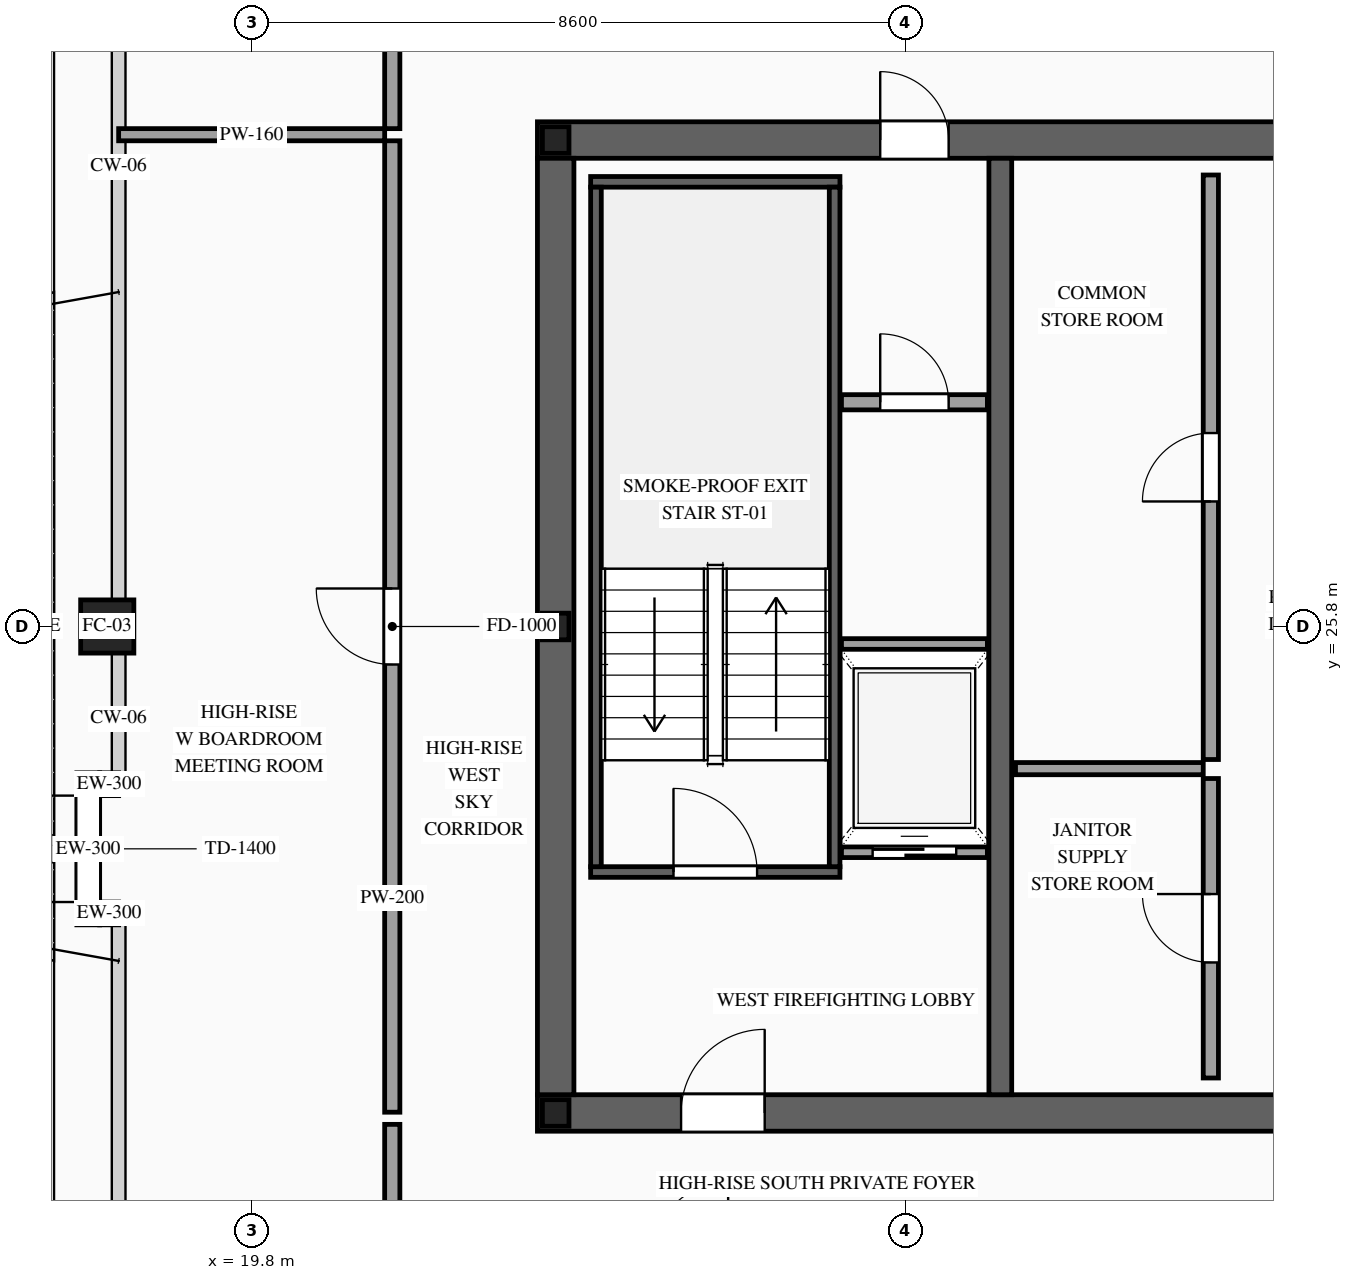
"""IFC4 building model, lengths in metres.
Left out: names, types, materials, properties, quantities, classifications, styles, units other than length and angle.
Written with IfcOpenShell. Run it as: python <this file> out.ifc"""

import sys

from ifc_helpers import new_model, si_unit, direction, frame, frame_2d, origin, origin_2d, place, context, subcontext, project, spatial, rectangle, hollow_rectangle, i_section, extrude, source, transform, mapped, element, fill, save


model = new_model("IFC4")
c1 = context("Model", 3, precision=1e-05, world=origin(), true_north=direction((0.0, 1.0)))
c2 = subcontext(c1, "Body", "Model", "MODEL_VIEW")
j1 = project(units=[si_unit("LENGTHUNIT", "METRE"), si_unit("PLANEANGLEUNIT", "RADIAN")], contexts=[c1])
p1 = place(None, origin())
s1 = spatial("IfcSite", under=j1, at=p1, CompositionType="ELEMENT")
p2 = place(p1, origin())
s2 = spatial("IfcBuilding", under=s1, at=p2, CompositionType="ELEMENT")
p3 = place(p2, frame((0.0, 0.0, 292.6)))
s3 = spatial("IfcBuildingStorey", under=s2, at=p3, CompositionType="ELEMENT", Elevation=292.6)
p4 = place(p3, frame((23.56, 19.4, 0.0), z_axis=(0.0, 0.0, 1.0), x_axis=(1.0, 0.0, 0.0)))
e1 = element("IfcWall", 1, at=p4, inside=s3, PredefinedType="SHEAR", context=c2, shape_type="SweptSolid", body=[
    extrude(rectangle(XDim=26.88, YDim=0.48, at=frame_2d((13.44, 0.0))), origin(), (0.0, 0.0, 1.0), 3.5),
])
p5 = place(p4, frame((1.89, 0.0, 0.0)))
e2 = element("IfcOpeningElement", 2, at=p5, cuts=e1, PredefinedType="OPENING", context=c2, shape_type="SweptSolid", body=[
    extrude(rectangle(XDim=1.1, YDim=2.2, at=frame_2d((0.55, 1.1))), frame((0.0, 0.255, 0.0), z_axis=(0.0, -1.0, 0.0), x_axis=(1.0, 0.0, 0.0)), (0.0, 0.0, 1.0), 0.51),
])
p6 = place(p4, frame((9.79, 0.0, 0.0)))
e3 = element("IfcOpeningElement", 3, at=p6, cuts=e1, PredefinedType="OPENING", context=c2, shape_type="SweptSolid", body=[
    extrude(rectangle(XDim=1.1, YDim=2.2, at=frame_2d((0.55, 1.1))), frame((0.0, 0.255, 0.0), z_axis=(0.0, -1.0, 0.0), x_axis=(1.0, 0.0, 0.0)), (0.0, 0.0, 1.0), 0.51),
])
p7 = place(p4, frame((22.99, 0.0, 0.0)))
e4 = element("IfcOpeningElement", 4, at=p7, cuts=e1, PredefinedType="OPENING", context=c2, shape_type="SweptSolid", body=[
    extrude(rectangle(XDim=1.1, YDim=2.2, at=frame_2d((0.55, 1.1))), frame((0.0, 0.255, 0.0), z_axis=(0.0, -1.0, 0.0), x_axis=(1.0, 0.0, 0.0)), (0.0, 0.0, 1.0), 0.51),
])
p8 = place(p4, frame((19.61, 0.0, 0.0)))
e5 = element("IfcOpeningElement", 5, at=p8, cuts=e1, PredefinedType="OPENING", context=c2, shape_type="SweptSolid", body=[
    extrude(rectangle(XDim=0.9, YDim=2.15, at=frame_2d((0.45, 1.075))), frame((0.0, 0.255, 0.0), z_axis=(0.0, -1.0, 0.0), x_axis=(1.0, 0.0, 0.0)), (0.0, 0.0, 1.0), 0.51),
])
p9 = place(p4, frame((18.17, 0.0, 0.0)))
e6 = element("IfcOpeningElement", 6, at=p9, cuts=e1, PredefinedType="OPENING", context=c2, shape_type="SweptSolid", body=[
    extrude(rectangle(XDim=0.9, YDim=2.15, at=frame_2d((0.45, 1.075))), frame((0.0, 0.255, 0.0), z_axis=(0.0, -1.0, 0.0), x_axis=(1.0, 0.0, 0.0)), (0.0, 0.0, 1.0), 0.51),
])
p10 = place(p3, frame((23.56, 32.2, 0.0), z_axis=(0.0, 0.0, 1.0), x_axis=(1.0, 0.0, 0.0)))
e7 = element("IfcWall", 7, at=p10, inside=s3, PredefinedType="SHEAR", context=c2, shape_type="SweptSolid", body=[
    extrude(rectangle(XDim=26.88, YDim=0.48, at=frame_2d((13.44, 0.0))), origin(), (0.0, 0.0, 1.0), 3.5),
])
p11 = place(p10, frame((4.51, 0.0, 0.0)))
e8 = element("IfcOpeningElement", 8, at=p11, cuts=e7, PredefinedType="OPENING", context=c2, shape_type="SweptSolid", body=[
    extrude(rectangle(XDim=0.9, YDim=2.15, at=frame_2d((0.45, 1.075))), frame((0.0, 0.255, 0.0), z_axis=(0.0, -1.0, 0.0), x_axis=(1.0, 0.0, 0.0)), (0.0, 0.0, 1.0), 0.51),
])
p12 = place(p10, frame((9.79, 0.0, 0.0)))
e9 = element("IfcOpeningElement", 9, at=p12, cuts=e7, PredefinedType="OPENING", context=c2, shape_type="SweptSolid", body=[
    extrude(rectangle(XDim=1.1, YDim=2.2, at=frame_2d((0.55, 1.1))), frame((0.0, 0.255, 0.0), z_axis=(0.0, -1.0, 0.0), x_axis=(1.0, 0.0, 0.0)), (0.0, 0.0, 1.0), 0.51),
])
p13 = place(p10, frame((15.64, 0.0, 0.0)))
e10 = element("IfcOpeningElement", 10, at=p13, cuts=e7, PredefinedType="OPENING", context=c2, shape_type="SweptSolid", body=[
    extrude(rectangle(XDim=1.1, YDim=2.2, at=frame_2d((0.55, 1.1))), frame((0.0, 0.255, 0.0), z_axis=(0.0, -1.0, 0.0), x_axis=(1.0, 0.0, 0.0)), (0.0, 0.0, 1.0), 0.51),
])
p14 = place(p10, frame((18.74, 0.0, 0.0)))
e11 = element("IfcOpeningElement", 11, at=p14, cuts=e7, PredefinedType="OPENING", context=c2, shape_type="SweptSolid", body=[
    extrude(rectangle(XDim=1.1, YDim=2.2, at=frame_2d((0.55, 1.1))), frame((0.0, 0.255, 0.0), z_axis=(0.0, -1.0, 0.0), x_axis=(1.0, 0.0, 0.0)), (0.0, 0.0, 1.0), 0.51),
])
m1 = source(origin(), c2, "Body", "SweptSolid", [
    extrude(rectangle(XDim=12.32, YDim=0.48, at=frame_2d((6.16, 0.0))), origin(), (0.0, 0.0, 1.0), 3.5),
])
p15 = place(p3, frame((23.8, 19.64, 0.0), z_axis=(0.0, 0.0, 1.0), x_axis=(0.0, 1.0, 0.0)))
e12 = element("IfcWall", 12, at=p15, inside=s3, PredefinedType="SHEAR", context=c2, shape_type="MappedRepresentation", body=[
    mapped(m1, transform((0.0, 0.0, 0.0), scale=1.0)),
])
m2 = source(origin(), c2, "Body", "SweptSolid", [
    extrude(rectangle(XDim=12.32, YDim=0.3, at=frame_2d((6.16, 0.0))), origin(), (0.0, 0.0, 1.0), 3.5),
])
p16 = place(p3, frame((29.65, 19.64, 0.0), z_axis=(0.0, 0.0, 1.0), x_axis=(0.0, 1.0, 0.0)))
e13 = element("IfcWall", 13, at=p16, inside=s3, PredefinedType="SOLIDWALL", context=c2, shape_type="MappedRepresentation", body=[
    mapped(m2, transform((0.0, 0.0, 0.0), scale=1.0)),
])
m3 = source(origin(), c2, "Body", "SweptSolid", [
    extrude(i_section(OverallWidth=0.35, OverallDepth=0.35, WebThickness=0.012, FlangeThickness=0.019, at=origin_2d()), origin(), (0.0, 0.0, 1.0), 3.5),
])
for number, where, z_axis, x_axis in (
    (14, (23.8, 19.4, 0.0), (0.0, 0.0, 1.0), (1.0, 0.0, 0.0)),
    (15, (23.8, 25.8, 0.0), (0.0, 0.0, 1.0), (1.0, 0.0, 0.0)),
    (16, (23.8, 32.2, 0.0), (0.0, 0.0, 1.0), (1.0, 0.0, 0.0)),
):
    element("IfcColumn", number, at=place(p3, frame(where, z_axis=z_axis, x_axis=x_axis)), inside=s3, PredefinedType="COLUMN", context=c2, shape_type="MappedRepresentation", body=[
        mapped(m3, transform((0.0, 0.0, 0.0), scale=1.0)),
    ])
m4 = source(origin(), c2, "Body", "SweptSolid", [
    extrude(hollow_rectangle(XDim=0.7, YDim=0.7, WallThickness=0.032, at=origin_2d()), origin(), (0.0, 0.0, 1.0), 3.5),
])
p17 = place(p3, frame((17.9, 25.8, 0.0), z_axis=(0.0, 0.0, 1.0), x_axis=(1.0, 0.0, 0.0)))
e17 = element("IfcColumn", 17, at=p17, inside=s3, PredefinedType="COLUMN", context=c2, shape_type="MappedRepresentation", body=[
    mapped(m4, transform((0.0, 0.0, 0.0), scale=1.0)),
])
p18 = place(p3, frame((17.65, 21.875, 0.0), z_axis=(0.0, 0.0, 1.0), x_axis=(0.0, 1.0, 0.0)))
e18 = element("IfcWall", 18, at=p18, inside=s3, PredefinedType="SOLIDWALL", context=c2, shape_type="SweptSolid", body=[
    extrude(rectangle(XDim=2.0, YDim=0.3, at=frame_2d((1.0, 0.0))), origin(), (0.0, 0.0, 1.0), 2.885),
])
p19 = place(p18, frame((0.3, 0.0, 0.0)))
e19 = element("IfcOpeningElement", 19, at=p19, cuts=e18, PredefinedType="OPENING", context=c2, shape_type="SweptSolid", body=[
    extrude(rectangle(XDim=1.4, YDim=2.3, at=frame_2d((0.7, 1.15))), frame((0.0, 0.165, 0.0), z_axis=(0.0, -1.0, 0.0), x_axis=(1.0, 0.0, 0.0)), (0.0, 0.0, 1.0), 0.33),
])
m5 = source(origin(), c2, "Body", "SweptSolid", [
    extrude(rectangle(XDim=0.25, YDim=0.3, at=frame_2d((0.125, 0.0))), origin(), (0.0, 0.0, 1.0), 3.28),
])
for number, where, z_axis, x_axis in (
    (20, (18.05, 22.025, 0.0), (0.0, 0.0, 1.0), (-1.0, 0.0, 0.0)),
    (21, (17.8, 23.725, 0.0), (0.0, 0.0, 1.0), (1.0, 0.0, 0.0)),
):
    element("IfcWall", number, at=place(p3, frame(where, z_axis=z_axis, x_axis=x_axis)), inside=s3, PredefinedType="SOLIDWALL", context=c2, shape_type="MappedRepresentation", body=[
        mapped(m5, transform((0.0, 0.0, 0.0), scale=1.0)),
    ])
p20 = place(p3, frame((27.56, 22.83, 0.0), z_axis=(0.0, 0.0, 1.0), x_axis=(1.0, 0.0, 0.0)))
e22 = element("IfcWall", 22, at=p20, inside=s3, PredefinedType="SOLIDWALL", context=c2, shape_type="SweptSolid", body=[
    extrude(rectangle(XDim=1.92, YDim=0.14, at=frame_2d((0.96, 0.0))), origin(), (0.0, 0.0, 1.0), 3.28),
])
p21 = place(p20, frame((0.41, 0.0, 0.0)))
e23 = element("IfcOpeningElement", 23, at=p21, cuts=e22, PredefinedType="OPENING", context=c2, shape_type="SweptSolid", body=[
    extrude(rectangle(XDim=1.1, YDim=2.2, at=frame_2d((0.55, 1.1))), frame((0.0, 0.085, 0.0), z_axis=(0.0, -1.0, 0.0), x_axis=(1.0, 0.0, 0.0)), (0.0, 0.0, 1.0), 0.17),
])
m6 = source(origin(), c2, "Body", "SweptSolid", [
    extrude(rectangle(XDim=1.92, YDim=0.14, at=frame_2d((0.96, 0.0))), origin(), (0.0, 0.0, 1.0), 3.28),
])
p22 = place(p3, frame((27.56, 25.57, 0.0), z_axis=(0.0, 0.0, 1.0), x_axis=(1.0, 0.0, 0.0)))
e24 = element("IfcWall", 24, at=p22, inside=s3, PredefinedType="SOLIDWALL", context=c2, shape_type="MappedRepresentation", body=[
    mapped(m6, transform((0.0, 0.0, 0.0), scale=1.0)),
])
p23 = place(p3, frame((24.26, 22.57, 0.0), z_axis=(0.0, 0.0, 1.0), x_axis=(1.0, 0.0, 0.0)))
e25 = element("IfcWall", 25, at=p23, inside=s3, PredefinedType="SOLIDWALL", context=c2, shape_type="SweptSolid", body=[
    extrude(rectangle(XDim=3.28, YDim=0.14, at=frame_2d((1.64, 0.0))), origin(), (0.0, 0.0, 1.0), 3.28),
])
p24 = place(p23, frame((1.09, 0.0, 0.0)))
e26 = element("IfcOpeningElement", 26, at=p24, cuts=e25, PredefinedType="OPENING", context=c2, shape_type="SweptSolid", body=[
    extrude(rectangle(XDim=1.1, YDim=2.2, at=frame_2d((0.55, 1.1))), frame((0.0, 0.085, 0.0), z_axis=(0.0, -1.0, 0.0), x_axis=(1.0, 0.0, 0.0)), (0.0, 0.0, 1.0), 0.17),
])
m7 = source(origin(), c2, "Body", "SweptSolid", [
    extrude(rectangle(XDim=3.28, YDim=0.14, at=frame_2d((1.64, 0.0))), origin(), (0.0, 0.0, 1.0), 3.28),
])
p25 = place(p3, frame((24.26, 31.65, 0.0), z_axis=(0.0, 0.0, 1.0), x_axis=(1.0, 0.0, 0.0)))
e27 = element("IfcWall", 27, at=p25, inside=s3, PredefinedType="SOLIDWALL", context=c2, shape_type="MappedRepresentation", body=[
    mapped(m7, transform((0.0, 0.0, 0.0), scale=1.0)),
])
m8 = source(origin(), c2, "Body", "SweptSolid", [
    extrude(rectangle(XDim=8.94, YDim=0.14, at=frame_2d((4.47, 0.0))), origin(), (0.0, 0.0, 1.0), 3.28),
])
for number, where, z_axis, x_axis in (
    (28, (24.33, 22.64, 0.0), (0.0, 0.0, 1.0), (0.0, 1.0, 0.0)),
    (29, (27.47, 22.64, 0.0), (0.0, 0.0, 1.0), (0.0, 1.0, 0.0)),
):
    element("IfcWall", number, at=place(p3, frame(where, z_axis=z_axis, x_axis=x_axis)), inside=s3, PredefinedType="SOLIDWALL", context=c2, shape_type="MappedRepresentation", body=[
        mapped(m8, transform((0.0, 0.0, 0.0), scale=1.0)),
    ])
p26 = place(p3, frame((27.56, 28.75, 0.0), z_axis=(0.0, 0.0, 1.0), x_axis=(1.0, 0.0, 0.0)))
e30 = element("IfcWall", 30, at=p26, inside=s3, PredefinedType="PARTITIONING", context=c2, shape_type="SweptSolid", body=[
    extrude(rectangle(XDim=1.92, YDim=0.2, at=frame_2d((0.96, 0.0))), origin(), (0.0, 0.0, 1.0), 3.28),
])
p27 = place(p26, frame((0.51, 0.0, 0.0)))
e31 = element("IfcOpeningElement", 31, at=p27, cuts=e30, PredefinedType="OPENING", context=c2, shape_type="SweptSolid", body=[
    extrude(rectangle(XDim=0.9, YDim=2.15, at=frame_2d((0.45, 1.075))), frame((0.0, 0.115, 0.0), z_axis=(0.0, -1.0, 0.0), x_axis=(1.0, 0.0, 0.0)), (0.0, 0.0, 1.0), 0.23),
])
p28 = place(p3, frame((32.42, 19.86, 0.0), z_axis=(0.0, 0.0, 1.0), x_axis=(0.0, 1.0, 0.0)))
e32 = element("IfcWall", 32, at=p28, inside=s3, PredefinedType="PARTITIONING", context=c2, shape_type="SweptSolid", body=[
    extrude(rectangle(XDim=3.94, YDim=0.2, at=frame_2d((1.97, 0.0))), origin(), (0.0, 0.0, 1.0), 3.28),
])
p29 = place(p28, frame((1.52, 0.0, 0.0)))
e33 = element("IfcOpeningElement", 33, at=p29, cuts=e32, PredefinedType="OPENING", context=c2, shape_type="SweptSolid", body=[
    extrude(rectangle(XDim=0.9, YDim=2.15, at=frame_2d((0.45, 1.075))), frame((0.0, 0.115, 0.0), z_axis=(0.0, -1.0, 0.0), x_axis=(1.0, 0.0, 0.0)), (0.0, 0.0, 1.0), 0.23),
])
p30 = place(p3, frame((32.42, 24.05, 0.0), z_axis=(0.0, 0.0, 1.0), x_axis=(0.0, 1.0, 0.0)))
e34 = element("IfcWall", 34, at=p30, inside=s3, PredefinedType="PARTITIONING", context=c2, shape_type="SweptSolid", body=[
    extrude(rectangle(XDim=7.69, YDim=0.2, at=frame_2d((3.845, 0.0))), origin(), (0.0, 0.0, 1.0), 3.28),
])
p31 = place(p30, frame((3.395, 0.0, 0.0)))
e35 = element("IfcOpeningElement", 35, at=p31, cuts=e34, PredefinedType="OPENING", context=c2, shape_type="SweptSolid", body=[
    extrude(rectangle(XDim=0.9, YDim=2.15, at=frame_2d((0.45, 1.075))), frame((0.0, 0.115, 0.0), z_axis=(0.0, -1.0, 0.0), x_axis=(1.0, 0.0, 0.0)), (0.0, 0.0, 1.0), 0.23),
])
m9 = source(origin(), c2, "Body", "SweptSolid", [
    extrude(rectangle(XDim=2.47, YDim=0.16, at=frame_2d((1.235, 0.0))), origin(), (0.0, 0.0, 1.0), 3.28),
])
p32 = place(p3, frame((29.85, 23.93, 0.0), z_axis=(0.0, 0.0, 1.0), x_axis=(1.0, 0.0, 0.0)))
e36 = element("IfcWall", 36, at=p32, inside=s3, PredefinedType="PARTITIONING", context=c2, shape_type="MappedRepresentation", body=[
    mapped(m9, transform((0.0, 0.0, 0.0), scale=1.0)),
])
m10 = source(origin(), c2, "Body", "SweptSolid", [
    extrude(rectangle(XDim=1.7, YDim=0.2, at=frame_2d((0.85, 0.0))), origin(), (0.0, 0.0, 1.0), 3.28),
])
for number, where, z_axis, x_axis in (
    (37, (21.65, 32.35, 0.0), (0.0, 0.0, 1.0), (0.0, 1.0, 0.0)),
    (38, (21.65, 17.55, 0.0), (0.0, 0.0, 1.0), (0.0, 1.0, 0.0)),
):
    element("IfcWall", number, at=place(p3, frame(where, z_axis=z_axis, x_axis=x_axis)), inside=s3, PredefinedType="PARTITIONING", context=c2, shape_type="MappedRepresentation", body=[
        mapped(m10, transform((0.0, 0.0, 0.0), scale=1.0)),
    ])
p33 = place(p3, frame((21.65, 19.41, 0.0), z_axis=(0.0, 0.0, 1.0), x_axis=(0.0, 1.0, 0.0)))
e39 = element("IfcWall", 39, at=p33, inside=s3, PredefinedType="PARTITIONING", context=c2, shape_type="SweptSolid", body=[
    extrude(rectangle(XDim=12.78, YDim=0.2, at=frame_2d((6.39, 0.0))), origin(), (0.0, 0.0, 1.0), 3.28),
])
p34 = place(p33, frame((5.89, 0.0, 0.0)))
e40 = element("IfcOpeningElement", 40, at=p34, cuts=e39, PredefinedType="OPENING", context=c2, shape_type="SweptSolid", body=[
    extrude(rectangle(XDim=1.0, YDim=2.2, at=frame_2d((0.5, 1.1))), frame((0.0, 0.115, 0.0), z_axis=(0.0, -1.0, 0.0), x_axis=(1.0, 0.0, 0.0)), (0.0, 0.0, 1.0), 0.23),
])
m11 = source(origin(), c2, "Body", "SweptSolid", [
    extrude(rectangle(XDim=3.5, YDim=0.16, at=frame_2d((1.75, 0.0))), origin(), (0.0, 0.0, 1.0), 2.825),
])
p35 = place(p3, frame((18.05, 32.27, 0.0), z_axis=(0.0, 0.0, 1.0), x_axis=(1.0, 0.0, 0.0)))
e41 = element("IfcWall", 41, at=p35, inside=s3, PredefinedType="PARTITIONING", context=c2, shape_type="MappedRepresentation", body=[
    mapped(m11, transform((0.0, 0.0, 0.0), scale=1.0)),
])
m12 = source(origin(), c2, "Body", "SweptSolid", [
    extrude(rectangle(XDim=1.4, YDim=2.3, at=frame_2d((0.7, 1.15))), frame((0.0, 0.025, 0.0), z_axis=(0.0, -1.0, 0.0), x_axis=(1.0, 0.0, 0.0)), (0.0, 0.0, 1.0), 0.05),
])
p36 = place(p19, origin())
e42 = element("IfcDoor", 42, at=p36, inside=s3, OperationType="DOUBLE_DOOR_SINGLE_SWING", PredefinedType="DOOR", context=c2, shape_type="MappedRepresentation", body=[
    mapped(m12, transform((0.0, 0.0, 0.0), scale=1.0)),
])
fill(e19, e42)
m13 = source(origin(), c2, "Body", "SweptSolid", [
    extrude(rectangle(XDim=1.1, YDim=2.2, at=frame_2d((0.55, 1.1))), frame((0.0, 0.025, 0.0), z_axis=(0.0, -1.0, 0.0), x_axis=(1.0, 0.0, 0.0)), (0.0, 0.0, 1.0), 0.05),
])
p37 = place(p21, origin())
e43 = element("IfcDoor", 43, at=p37, inside=s3, OperationType="SLIDING_TO_LEFT", PredefinedType="DOOR", context=c2, shape_type="MappedRepresentation", body=[
    mapped(m13, transform((0.0, 0.0, 0.0), scale=1.0)),
])
fill(e23, e43)
m14 = source(origin(), c2, "Body", "SweptSolid", [
    extrude(rectangle(XDim=1.1, YDim=2.2, at=frame_2d((0.55, 1.1))), frame((0.0, 0.025, 0.0), z_axis=(0.0, -1.0, 0.0), x_axis=(1.0, 0.0, 0.0)), (0.0, 0.0, 1.0), 0.05),
])
p38 = place(p24, origin())
e44 = element("IfcDoor", 44, at=p38, inside=s3, OperationType="SINGLE_SWING_LEFT", PredefinedType="DOOR", context=c2, shape_type="MappedRepresentation", body=[
    mapped(m14, transform((0.0, 0.0, 0.0), scale=1.0)),
])
fill(e26, e44)
p39 = place(p5, origin())
e45 = element("IfcDoor", 45, at=p39, inside=s3, OperationType="SINGLE_SWING_RIGHT", PredefinedType="DOOR", context=c2, shape_type="MappedRepresentation", body=[
    mapped(m14, transform((0.0, 0.0, 0.0), scale=1.0)),
])
fill(e2, e45)
m15 = source(origin(), c2, "Body", "SweptSolid", [
    extrude(rectangle(XDim=0.9, YDim=2.15, at=frame_2d((0.45, 1.075))), frame((0.0, 0.025, 0.0), z_axis=(0.0, -1.0, 0.0), x_axis=(1.0, 0.0, 0.0)), (0.0, 0.0, 1.0), 0.05),
])
p40 = place(p11, origin())
e46 = element("IfcDoor", 46, at=p40, inside=s3, OperationType="SINGLE_SWING_LEFT", PredefinedType="DOOR", context=c2, shape_type="MappedRepresentation", body=[
    mapped(m15, transform((0.0, 0.0, 0.0), scale=1.0)),
])
fill(e8, e46)
p41 = place(p27, origin())
e47 = element("IfcDoor", 47, at=p41, inside=s3, OperationType="SINGLE_SWING_LEFT", PredefinedType="DOOR", context=c2, shape_type="MappedRepresentation", body=[
    mapped(m15, transform((0.0, 0.0, 0.0), scale=1.0)),
])
fill(e31, e47)
p42 = place(p29, origin())
e48 = element("IfcDoor", 48, at=p42, inside=s3, OperationType="SINGLE_SWING_RIGHT", PredefinedType="DOOR", context=c2, shape_type="MappedRepresentation", body=[
    mapped(m15, transform((0.0, 0.0, 0.0), scale=1.0)),
])
fill(e33, e48)
p43 = place(p31, origin())
e49 = element("IfcDoor", 49, at=p43, inside=s3, OperationType="SINGLE_SWING_LEFT", PredefinedType="DOOR", context=c2, shape_type="MappedRepresentation", body=[
    mapped(m15, transform((0.0, 0.0, 0.0), scale=1.0)),
])
fill(e35, e49)
m16 = source(origin(), c2, "Body", "SweptSolid", [
    extrude(rectangle(XDim=1.0, YDim=2.2, at=frame_2d((0.5, 1.1))), frame((0.0, 0.025, 0.0), z_axis=(0.0, -1.0, 0.0), x_axis=(1.0, 0.0, 0.0)), (0.0, 0.0, 1.0), 0.05),
])
p44 = place(p34, origin())
e50 = element("IfcDoor", 50, at=p44, inside=s3, OperationType="SINGLE_SWING_RIGHT", PredefinedType="DOOR", context=c2, shape_type="MappedRepresentation", body=[
    mapped(m16, transform((0.0, 0.0, 0.0), scale=1.0)),
])
fill(e40, e50)
save(model, sys.argv[1])
